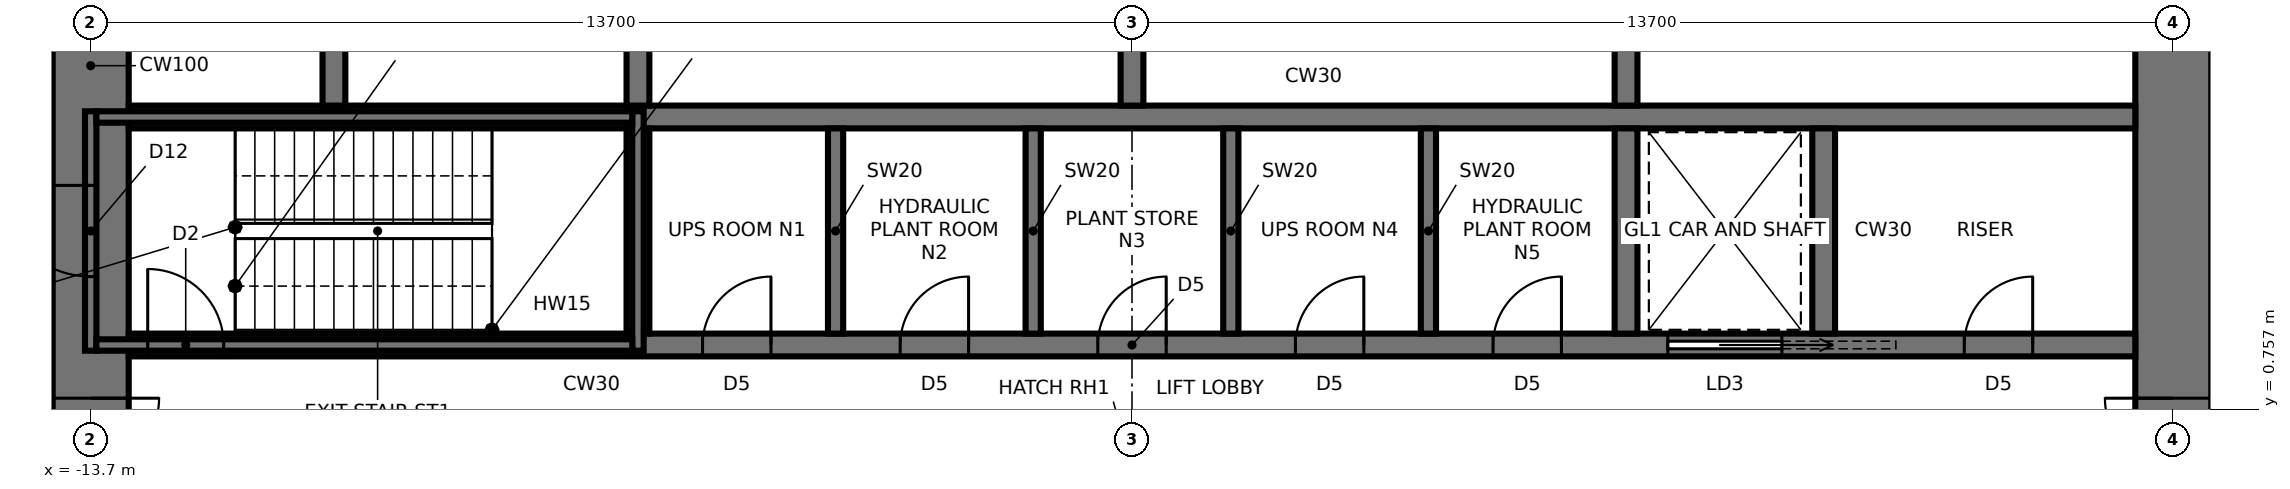
"""IFC4 building model, lengths in metres.
Left out: names, types, materials, properties, quantities, classifications, styles, units other than length and angle.
Written with IfcOpenShell. Run it as: python <this file> out.ifc"""

import sys

from ifc_helpers import new_model, si_unit, direction, frame, frame_2d, origin, place, context, subcontext, project, spatial, rectangle, extrude, element, fill, save


model = new_model("IFC4")
c1 = context("Model", 3, precision=1e-05, world=origin(), true_north=direction((0.0, 1.0)))
c2 = subcontext(c1, "Body", "Model", "MODEL_VIEW")
j1 = project(units=[si_unit("LENGTHUNIT", "METRE"), si_unit("PLANEANGLEUNIT", "RADIAN")], contexts=[c1])
p1 = place(None, origin())
s1 = spatial("IfcSite", under=j1, at=p1, CompositionType="ELEMENT")
p2 = place(p1, origin())
s2 = spatial("IfcBuilding", under=s1, at=p2, CompositionType="ELEMENT")
p3 = place(p2, frame((0.0, 0.0, 277.0)))
s3 = spatial("IfcBuildingStorey", under=s2, at=p3, CompositionType="ELEMENT", Elevation=277.0)
p4 = place(p3, frame((13.7, -9.5, 0.0), z_axis=(0.0, 0.0, 1.0), x_axis=(0.0, 1.0, 0.0)))
e1 = element("IfcWall", 1, at=p4, inside=s3, PredefinedType="SHEAR", context=c2, shape_type="SweptSolid", body=[
    extrude(rectangle(XDim=19.0, YDim=1.0, at=frame_2d((9.5, 0.0))), origin(), (0.0, 0.0, 1.0), 5.0),
])
p5 = place(p4, frame((8.6, 0.0, 0.0)))
e2 = element("IfcOpeningElement", 2, at=p5, cuts=e1, PredefinedType="OPENING", context=c2, shape_type="SweptSolid", body=[
    extrude(rectangle(XDim=1.8, YDim=2.4, at=frame_2d((0.9, 1.2))), frame((0.0, 0.51, 0.0), z_axis=(0.0, -1.0, 0.0), x_axis=(1.0, 0.0, 0.0)), (0.0, 0.0, 1.0), 1.02),
])
p6 = place(p3, frame((-13.7, 9.5, 0.0), z_axis=(0.0, 0.0, 1.0), x_axis=(0.0, -1.0, 0.0)))
e3 = element("IfcWall", 3, at=p6, inside=s3, PredefinedType="SHEAR", context=c2, shape_type="SweptSolid", body=[
    extrude(rectangle(XDim=19.0, YDim=1.0, at=frame_2d((9.5, 0.0))), origin(), (0.0, 0.0, 1.0), 5.0),
])
p7 = place(p6, frame((8.6, 0.0, 0.0)))
e4 = element("IfcOpeningElement", 4, at=p7, cuts=e3, PredefinedType="OPENING", context=c2, shape_type="SweptSolid", body=[
    extrude(rectangle(XDim=1.8, YDim=2.4, at=frame_2d((0.9, 1.2))), frame((0.0, 0.51, 0.0), z_axis=(0.0, -1.0, 0.0), x_axis=(1.0, 0.0, 0.0)), (0.0, 0.0, 1.0), 1.02),
])
p8 = place(p3, frame((-13.2, 1.6, 0.0), z_axis=(0.0, 0.0, 1.0), x_axis=(1.0, 0.0, 0.0)))
e5 = element("IfcWall", 5, at=p8, inside=s3, PredefinedType="SHEAR", context=c2, shape_type="SweptSolid", body=[
    extrude(rectangle(XDim=26.4, YDim=0.3, at=frame_2d((13.2, 0.0))), origin(), (0.0, 0.0, 1.0), 5.0),
])
p9 = place(p8, frame((0.25, 0.0, 0.0)))
e6 = element("IfcOpeningElement", 6, at=p9, cuts=e5, PredefinedType="OPENING", context=c2, shape_type="SweptSolid", body=[
    extrude(rectangle(XDim=1.0, YDim=2.1, at=frame_2d((0.5, 1.05))), frame((0.0, 0.16, 0.0), z_axis=(0.0, -1.0, 0.0), x_axis=(1.0, 0.0, 0.0)), (0.0, 0.0, 1.0), 0.32),
])
p10 = place(p8, frame((20.25, 0.0, 0.0)))
e7 = element("IfcOpeningElement", 7, at=p10, cuts=e5, PredefinedType="OPENING", context=c2, shape_type="SweptSolid", body=[
    extrude(rectangle(XDim=1.5, YDim=2.4, at=frame_2d((0.75, 1.2))), frame((0.0, 0.16, 0.0), z_axis=(0.0, -1.0, 0.0), x_axis=(1.0, 0.0, 0.0)), (0.0, 0.0, 1.0), 0.32),
])
p11 = place(p8, frame((7.55, 0.0, 0.0)))
e8 = element("IfcOpeningElement", 8, at=p11, cuts=e5, PredefinedType="OPENING", context=c2, shape_type="SweptSolid", body=[
    extrude(rectangle(XDim=0.9, YDim=2.1, at=frame_2d((0.45, 1.05))), frame((0.0, 0.16, 0.0), z_axis=(0.0, -1.0, 0.0), x_axis=(1.0, 0.0, 0.0)), (0.0, 0.0, 1.0), 0.32),
])
p12 = place(p8, frame((10.15, 0.0, 0.0)))
e9 = element("IfcOpeningElement", 9, at=p12, cuts=e5, PredefinedType="OPENING", context=c2, shape_type="SweptSolid", body=[
    extrude(rectangle(XDim=0.9, YDim=2.1, at=frame_2d((0.45, 1.05))), frame((0.0, 0.16, 0.0), z_axis=(0.0, -1.0, 0.0), x_axis=(1.0, 0.0, 0.0)), (0.0, 0.0, 1.0), 0.32),
])
p13 = place(p8, frame((12.75, 0.0, 0.0)))
e10 = element("IfcOpeningElement", 10, at=p13, cuts=e5, PredefinedType="OPENING", context=c2, shape_type="SweptSolid", body=[
    extrude(rectangle(XDim=0.9, YDim=2.1, at=frame_2d((0.45, 1.05))), frame((0.0, 0.16, 0.0), z_axis=(0.0, -1.0, 0.0), x_axis=(1.0, 0.0, 0.0)), (0.0, 0.0, 1.0), 0.32),
])
p14 = place(p8, frame((15.35, 0.0, 0.0)))
e11 = element("IfcOpeningElement", 11, at=p14, cuts=e5, PredefinedType="OPENING", context=c2, shape_type="SweptSolid", body=[
    extrude(rectangle(XDim=0.9, YDim=2.1, at=frame_2d((0.45, 1.05))), frame((0.0, 0.16, 0.0), z_axis=(0.0, -1.0, 0.0), x_axis=(1.0, 0.0, 0.0)), (0.0, 0.0, 1.0), 0.32),
])
p15 = place(p8, frame((17.95, 0.0, 0.0)))
e12 = element("IfcOpeningElement", 12, at=p15, cuts=e5, PredefinedType="OPENING", context=c2, shape_type="SweptSolid", body=[
    extrude(rectangle(XDim=0.9, YDim=2.1, at=frame_2d((0.45, 1.05))), frame((0.0, 0.16, 0.0), z_axis=(0.0, -1.0, 0.0), x_axis=(1.0, 0.0, 0.0)), (0.0, 0.0, 1.0), 0.32),
])
p16 = place(p8, frame((24.15, 0.0, 0.0)))
e13 = element("IfcOpeningElement", 13, at=p16, cuts=e5, PredefinedType="OPENING", context=c2, shape_type="SweptSolid", body=[
    extrude(rectangle(XDim=0.9, YDim=2.1, at=frame_2d((0.45, 1.05))), frame((0.0, 0.16, 0.0), z_axis=(0.0, -1.0, 0.0), x_axis=(1.0, 0.0, 0.0)), (0.0, 0.0, 1.0), 0.32),
])
p17 = place(p3, frame((-13.2, 4.6, 0.0), z_axis=(0.0, 0.0, 1.0), x_axis=(1.0, 0.0, 0.0)))
e14 = element("IfcWall", 14, at=p17, inside=s3, PredefinedType="SHEAR", context=c2, shape_type="SweptSolid", body=[
    extrude(rectangle(XDim=26.4, YDim=0.3, at=frame_2d((13.2, 0.0))), origin(), (0.0, 0.0, 1.0), 5.0),
])
p18 = place(p3, frame((-6.5, 1.75, 0.0), z_axis=(0.0, 0.0, 1.0), x_axis=(0.0, 1.0, 0.0)))
e15 = element("IfcWall", 15, at=p18, inside=s3, PredefinedType="SHEAR", context=c2, shape_type="SweptSolid", body=[
    extrude(rectangle(XDim=2.7, YDim=0.3, at=frame_2d((1.35, 0.0))), origin(), (0.0, 0.0, 1.0), 5.0),
])
p19 = place(p3, frame((-6.5, 4.75, 0.0), z_axis=(0.0, 0.0, 1.0), x_axis=(0.0, 1.0, 0.0)))
e16 = element("IfcWall", 16, at=p19, inside=s3, PredefinedType="SHEAR", context=c2, shape_type="SweptSolid", body=[
    extrude(rectangle(XDim=3.75, YDim=0.3, at=frame_2d((1.875, 0.0))), origin(), (0.0, 0.0, 1.0), 5.0),
])
p20 = place(p3, frame((6.5, 1.75, 0.0), z_axis=(0.0, 0.0, 1.0), x_axis=(0.0, 1.0, 0.0)))
e17 = element("IfcWall", 17, at=p20, inside=s3, PredefinedType="SHEAR", context=c2, shape_type="SweptSolid", body=[
    extrude(rectangle(XDim=2.7, YDim=0.3, at=frame_2d((1.35, 0.0))), origin(), (0.0, 0.0, 1.0), 5.0),
])
p21 = place(p3, frame((6.5, 4.75, 0.0), z_axis=(0.0, 0.0, 1.0), x_axis=(0.0, 1.0, 0.0)))
e18 = element("IfcWall", 18, at=p21, inside=s3, PredefinedType="SHEAR", context=c2, shape_type="SweptSolid", body=[
    extrude(rectangle(XDim=3.75, YDim=0.3, at=frame_2d((1.875, 0.0))), origin(), (0.0, 0.0, 1.0), 5.0),
])
for number, where, z_axis, x_axis in (
    (19, (-3.9, 1.75, 0.0), (0.0, 0.0, 1.0), (0.0, 1.0, 0.0)),
    (20, (-1.3, 1.75, 0.0), (0.0, 0.0, 1.0), (0.0, 1.0, 0.0)),
    (21, (1.3, 1.75, 0.0), (0.0, 0.0, 1.0), (0.0, 1.0, 0.0)),
    (22, (3.9, 1.75, 0.0), (0.0, 0.0, 1.0), (0.0, 1.0, 0.0)),
):
    element("IfcWall", number, at=place(p3, frame(where, z_axis=z_axis, x_axis=x_axis)), inside=s3, PredefinedType="SHEAR", context=c2, shape_type="SweptSolid", body=[
        extrude(rectangle(XDim=2.7, YDim=0.2, at=frame_2d((1.35, 0.0))), origin(), (0.0, 0.0, 1.0), 5.0),
    ])
for number, where, z_axis, x_axis in (
    (23, (0.0, 4.75, 0.0), (0.0, 0.0, 1.0), (0.0, 1.0, 0.0)),
    (24, (-10.5, 4.75, 0.0), (0.0, 0.0, 1.0), (0.0, 1.0, 0.0)),
):
    element("IfcWall", number, at=place(p3, frame(where, z_axis=z_axis, x_axis=x_axis)), inside=s3, PredefinedType="SHEAR", context=c2, shape_type="SweptSolid", body=[
        extrude(rectangle(XDim=3.75, YDim=0.3, at=frame_2d((1.875, 0.0))), origin(), (0.0, 0.0, 1.0), 5.0),
    ])
p22 = place(p3, frame((9.1, 1.75, 0.0), z_axis=(0.0, 0.0, 1.0), x_axis=(0.0, 1.0, 0.0)))
e25 = element("IfcWall", 25, at=p22, inside=s3, PredefinedType="SHEAR", context=c2, shape_type="SweptSolid", body=[
    extrude(rectangle(XDim=2.7, YDim=0.3, at=frame_2d((1.35, 0.0))), origin(), (0.0, 0.0, 1.0), 5.0),
])
p23 = place(p3, frame((-13.7, 1.525, 5.0), z_axis=(0.0, 0.0, 1.0), x_axis=(0.0, 1.0, 0.0)))
e26 = element("IfcWall", 26, at=p23, inside=s3, PredefinedType="SOLIDWALL", context=c2, shape_type="SweptSolid", body=[
    extrude(rectangle(XDim=3.15, YDim=0.15, at=frame_2d((1.575, 0.0))), origin(), (0.0, 0.0, 1.0), 2.82),
])
p24 = place(p23, frame((0.975, 0.0, 0.0)))
e27 = element("IfcOpeningElement", 27, at=p24, cuts=e26, PredefinedType="OPENING", context=c2, shape_type="SweptSolid", body=[
    extrude(rectangle(XDim=1.2, YDim=2.1, at=frame_2d((0.6, 1.05))), frame((0.0, 0.085, 0.0), z_axis=(0.0, -1.0, 0.0), x_axis=(1.0, 0.0, 0.0)), (0.0, 0.0, 1.0), 0.17),
])
p25 = place(p3, frame((-6.5, 1.525, 5.0), z_axis=(0.0, 0.0, 1.0), x_axis=(0.0, 1.0, 0.0)))
e28 = element("IfcWall", 28, at=p25, inside=s3, PredefinedType="SOLIDWALL", context=c2, shape_type="SweptSolid", body=[
    extrude(rectangle(XDim=3.15, YDim=0.15, at=frame_2d((1.575, 0.0))), origin(), (0.0, 0.0, 1.0), 2.82),
])
p26 = place(p3, frame((-13.625, 1.6, 5.0), z_axis=(0.0, 0.0, 1.0), x_axis=(1.0, 0.0, 0.0)))
e29 = element("IfcWall", 29, at=p26, inside=s3, PredefinedType="SOLIDWALL", context=c2, shape_type="SweptSolid", body=[
    extrude(rectangle(XDim=7.05, YDim=0.15, at=frame_2d((3.525, 0.0))), origin(), (0.0, 0.0, 1.0), 2.82),
])
p27 = place(p26, frame((5.65, 0.0, 1.9)))
e30 = element("IfcOpeningElement", 30, at=p27, cuts=e29, PredefinedType="OPENING", context=c2, shape_type="SweptSolid", body=[
    extrude(rectangle(XDim=0.9, YDim=0.6, at=frame_2d((0.45, 0.3))), frame((0.0, 0.085, 0.0), z_axis=(0.0, -1.0, 0.0), x_axis=(1.0, 0.0, 0.0)), (0.0, 0.0, 1.0), 0.17),
])
p28 = place(p3, frame((-13.625, 4.6, 5.0), z_axis=(0.0, 0.0, 1.0), x_axis=(1.0, 0.0, 0.0)))
e31 = element("IfcWall", 31, at=p28, inside=s3, PredefinedType="SOLIDWALL", context=c2, shape_type="SweptSolid", body=[
    extrude(rectangle(XDim=7.05, YDim=0.15, at=frame_2d((3.525, 0.0))), origin(), (0.0, 0.0, 1.0), 2.82),
])
p29 = place(p7, origin())
e32 = element("IfcDoor", 32, at=p29, inside=s3, OperationType="DOUBLE_DOOR_SINGLE_SWING", PredefinedType="DOOR", context=c2, shape_type="SweptSolid", body=[
    extrude(rectangle(XDim=1.72, YDim=2.36, at=frame_2d((0.9, 1.18))), frame((0.0, 0.025, 0.0), z_axis=(0.0, -1.0, 0.0), x_axis=(1.0, 0.0, 0.0)), (0.0, 0.0, 1.0), 0.05),
    extrude(rectangle(XDim=0.04, YDim=2.4, at=frame_2d((0.02, 1.2))), frame((0.0, 0.25, 0.0), z_axis=(0.0, -1.0, 0.0), x_axis=(1.0, 0.0, 0.0)), (0.0, 0.0, 1.0), 0.5),
    extrude(rectangle(XDim=0.04, YDim=2.4, at=frame_2d((1.78, 1.2))), frame((0.0, 0.25, 0.0), z_axis=(0.0, -1.0, 0.0), x_axis=(1.0, 0.0, 0.0)), (0.0, 0.0, 1.0), 0.5),
    extrude(rectangle(XDim=1.72, YDim=0.04, at=frame_2d((0.9, 2.38))), frame((0.0, 0.25, 0.0), z_axis=(0.0, -1.0, 0.0), x_axis=(1.0, 0.0, 0.0)), (0.0, 0.0, 1.0), 0.5),
])
fill(e4, e32)
p30 = place(p5, origin())
e33 = element("IfcDoor", 33, at=p30, inside=s3, OperationType="DOUBLE_DOOR_SINGLE_SWING", PredefinedType="DOOR", context=c2, shape_type="SweptSolid", body=[
    extrude(rectangle(XDim=1.72, YDim=2.36, at=frame_2d((0.9, 1.18))), frame((0.0, 0.025, 0.0), z_axis=(0.0, -1.0, 0.0), x_axis=(1.0, 0.0, 0.0)), (0.0, 0.0, 1.0), 0.05),
    extrude(rectangle(XDim=0.04, YDim=2.4, at=frame_2d((0.02, 1.2))), frame((0.0, 0.25, 0.0), z_axis=(0.0, -1.0, 0.0), x_axis=(1.0, 0.0, 0.0)), (0.0, 0.0, 1.0), 0.5),
    extrude(rectangle(XDim=0.04, YDim=2.4, at=frame_2d((1.78, 1.2))), frame((0.0, 0.25, 0.0), z_axis=(0.0, -1.0, 0.0), x_axis=(1.0, 0.0, 0.0)), (0.0, 0.0, 1.0), 0.5),
    extrude(rectangle(XDim=1.72, YDim=0.04, at=frame_2d((0.9, 2.38))), frame((0.0, 0.25, 0.0), z_axis=(0.0, -1.0, 0.0), x_axis=(1.0, 0.0, 0.0)), (0.0, 0.0, 1.0), 0.5),
])
fill(e2, e33)
p31 = place(p9, origin())
e34 = element("IfcDoor", 34, at=p31, inside=s3, OperationType="SINGLE_SWING_LEFT", PredefinedType="DOOR", context=c2, shape_type="SweptSolid", body=[
    extrude(rectangle(XDim=1.0, YDim=2.1, at=frame_2d((0.5, 1.05))), frame((0.0, 0.025, 0.0), z_axis=(0.0, -1.0, 0.0), x_axis=(1.0, 0.0, 0.0)), (0.0, 0.0, 1.0), 0.05),
])
fill(e6, e34)
p32 = place(p10, origin())
e35 = element("IfcDoor", 35, at=p32, inside=s3, OperationType="SLIDING_TO_RIGHT", PredefinedType="DOOR", context=c2, shape_type="SweptSolid", body=[
    extrude(rectangle(XDim=1.5, YDim=2.4, at=frame_2d((0.75, 1.2))), frame((0.0, 0.025, 0.0), z_axis=(0.0, -1.0, 0.0), x_axis=(1.0, 0.0, 0.0)), (0.0, 0.0, 1.0), 0.05),
])
fill(e7, e35)
p33 = place(p11, origin())
e36 = element("IfcDoor", 36, at=p33, inside=s3, OperationType="SINGLE_SWING_RIGHT", PredefinedType="DOOR", context=c2, shape_type="SweptSolid", body=[
    extrude(rectangle(XDim=0.9, YDim=2.1, at=frame_2d((0.45, 1.05))), frame((0.0, 0.025, 0.0), z_axis=(0.0, -1.0, 0.0), x_axis=(1.0, 0.0, 0.0)), (0.0, 0.0, 1.0), 0.05),
])
fill(e8, e36)
p34 = place(p12, origin())
e37 = element("IfcDoor", 37, at=p34, inside=s3, OperationType="SINGLE_SWING_RIGHT", PredefinedType="DOOR", context=c2, shape_type="SweptSolid", body=[
    extrude(rectangle(XDim=0.9, YDim=2.1, at=frame_2d((0.45, 1.05))), frame((0.0, 0.025, 0.0), z_axis=(0.0, -1.0, 0.0), x_axis=(1.0, 0.0, 0.0)), (0.0, 0.0, 1.0), 0.05),
])
fill(e9, e37)
p35 = place(p13, origin())
e38 = element("IfcDoor", 38, at=p35, inside=s3, OperationType="SINGLE_SWING_RIGHT", PredefinedType="DOOR", context=c2, shape_type="SweptSolid", body=[
    extrude(rectangle(XDim=0.9, YDim=2.1, at=frame_2d((0.45, 1.05))), frame((0.0, 0.025, 0.0), z_axis=(0.0, -1.0, 0.0), x_axis=(1.0, 0.0, 0.0)), (0.0, 0.0, 1.0), 0.05),
])
fill(e10, e38)
p36 = place(p14, origin())
e39 = element("IfcDoor", 39, at=p36, inside=s3, OperationType="SINGLE_SWING_RIGHT", PredefinedType="DOOR", context=c2, shape_type="SweptSolid", body=[
    extrude(rectangle(XDim=0.9, YDim=2.1, at=frame_2d((0.45, 1.05))), frame((0.0, 0.025, 0.0), z_axis=(0.0, -1.0, 0.0), x_axis=(1.0, 0.0, 0.0)), (0.0, 0.0, 1.0), 0.05),
])
fill(e11, e39)
p37 = place(p15, origin())
e40 = element("IfcDoor", 40, at=p37, inside=s3, OperationType="SINGLE_SWING_RIGHT", PredefinedType="DOOR", context=c2, shape_type="SweptSolid", body=[
    extrude(rectangle(XDim=0.9, YDim=2.1, at=frame_2d((0.45, 1.05))), frame((0.0, 0.025, 0.0), z_axis=(0.0, -1.0, 0.0), x_axis=(1.0, 0.0, 0.0)), (0.0, 0.0, 1.0), 0.05),
])
fill(e12, e40)
p38 = place(p16, origin())
e41 = element("IfcDoor", 41, at=p38, inside=s3, OperationType="SINGLE_SWING_RIGHT", PredefinedType="DOOR", context=c2, shape_type="SweptSolid", body=[
    extrude(rectangle(XDim=0.9, YDim=2.1, at=frame_2d((0.45, 1.05))), frame((0.0, 0.025, 0.0), z_axis=(0.0, -1.0, 0.0), x_axis=(1.0, 0.0, 0.0)), (0.0, 0.0, 1.0), 0.05),
])
fill(e13, e41)
p39 = place(p24, origin())
e42 = element("IfcDoor", 42, at=p39, inside=s3, OperationType="SINGLE_SWING_RIGHT", PredefinedType="DOOR", context=c2, shape_type="SweptSolid", body=[
    extrude(rectangle(XDim=1.2, YDim=2.1, at=frame_2d((0.6, 1.05))), frame((0.0, 0.025, 0.0), z_axis=(0.0, -1.0, 0.0), x_axis=(1.0, 0.0, 0.0)), (0.0, 0.0, 1.0), 0.05),
])
fill(e27, e42)
save(model, sys.argv[1])
